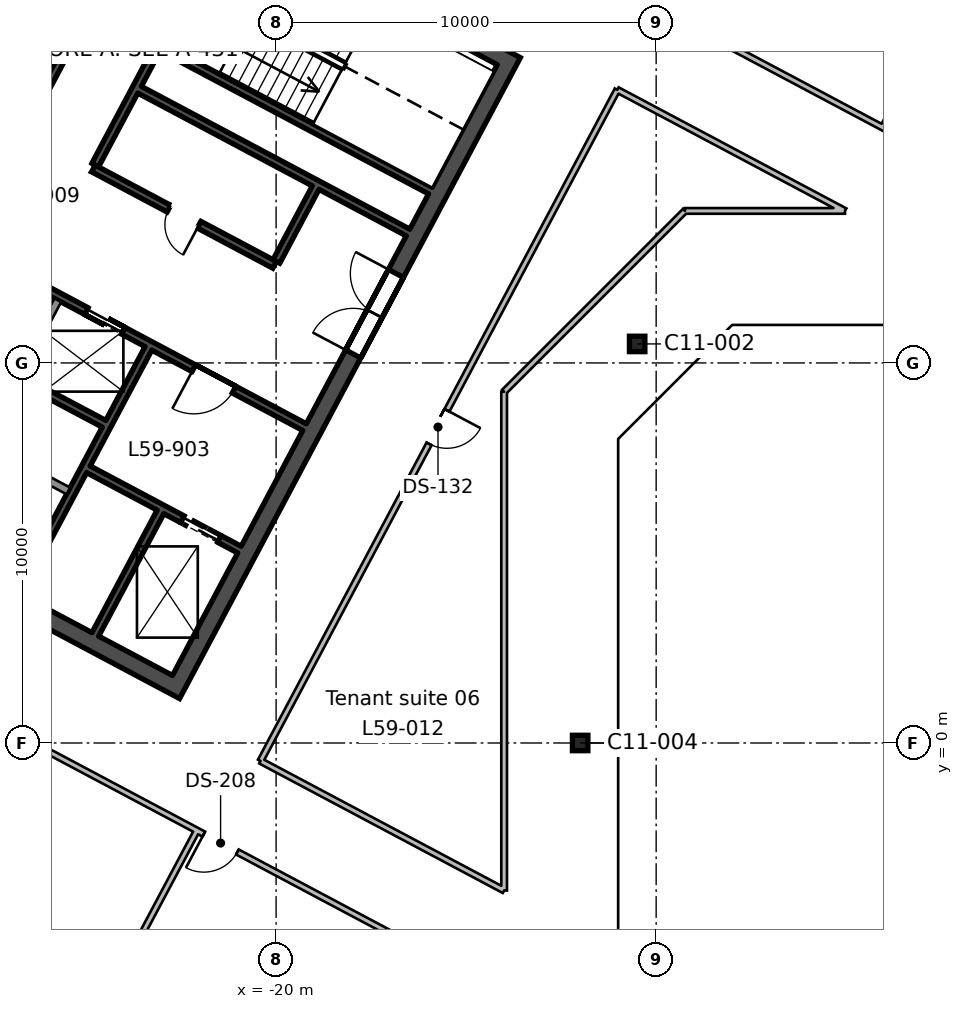
"""IFC4 building model, lengths in metres.
Left out: names, types, materials, properties, quantities, classifications, styles, units other than length and angle.
Written with IfcOpenShell. Run it as: python <this file> out.ifc"""

import sys

from ifc_helpers import new_model, si_unit, direction, frame, frame_2d, origin, origin_2d, place, context, subcontext, project, spatial, rectangle, hollow_rectangle, extrude, element, fill, save


model = new_model("IFC4")
c1 = context("Model", 3, precision=1e-05, world=origin(), true_north=direction((0.0, 1.0)))
c2 = subcontext(c1, "Body", "Model", "MODEL_VIEW")
j1 = project(units=[si_unit("LENGTHUNIT", "METRE"), si_unit("PLANEANGLEUNIT", "RADIAN")], contexts=[c1])
p1 = place(None, origin())
s1 = spatial("IfcSite", under=j1, at=p1, CompositionType="ELEMENT")
p2 = place(p1, origin())
s2 = spatial("IfcBuilding", under=s1, at=p2, CompositionType="ELEMENT")
p3 = place(p2, frame((0.0, 0.0, 265.8)))
s3 = spatial("IfcBuildingStorey", under=s2, at=p3, CompositionType="ELEMENT", Elevation=265.8)
for number, where, z_axis, x_axis in (
    (1, (-12.0, 0.0, 0.0), (0.0, 0.0, 1.0), (1.0, 0.0, 0.0)),
    (2, (-10.5, 10.5, 0.0), (0.0, 0.0, 1.0), (1.0, 0.0, 0.0)),
):
    element("IfcColumn", number, at=place(p3, frame(where, z_axis=z_axis, x_axis=x_axis)), inside=s3, PredefinedType="COLUMN", context=c2, shape_type="SweptSolid", body=[
        extrude(hollow_rectangle(XDim=0.406, YDim=0.406, WallThickness=0.009, InnerFilletRadius=0.004, OuterFilletRadius=0.013, at=origin_2d()), origin(), (0.0, 0.0, 1.0), 3.9),
    ])
p4 = place(p3, frame((-13.771, 18.138, 0.0), z_axis=(0.0, 0.0, 1.0), x_axis=(-0.469467968382, -0.882949504028, 0.0)))
e3 = element("IfcWall", 3, at=p4, inside=s3, PredefinedType="SHEAR", context=c2, shape_type="SweptSolid", body=[
    extrude(rectangle(XDim=19.1, YDim=0.45, at=frame_2d((9.55, 0.0))), origin(), (0.0, 0.0, 1.0), 3.9),
])
p5 = place(p4, frame((6.55, 0.0, 0.0)))
e4 = element("IfcOpeningElement", 4, at=p5, cuts=e3, PredefinedType="OPENING", context=c2, shape_type="SweptSolid", body=[
    extrude(rectangle(XDim=2.4, YDim=2.4, at=frame_2d((1.2, 1.2))), frame((0.0, 0.235, 0.0), z_axis=(0.0, -1.0, 0.0), x_axis=(1.0, 0.0, 0.0)), (0.0, 0.0, 1.0), 0.47),
])
p6 = place(p3, frame((-14.076, 18.045, 0.0), z_axis=(0.0, 0.0, 1.0), x_axis=(-0.882947755831, 0.46947125628, 0.0)))
e5 = element("IfcWall", 5, at=p6, inside=s3, PredefinedType="SHEAR", context=c2, shape_type="SweptSolid", body=[
    extrude(rectangle(XDim=20.2, YDim=0.45, at=frame_2d((10.1, 0.0))), origin(), (0.0, 0.0, 1.0), 3.9),
])
p7 = place(p3, frame((-22.832, 1.578, 0.0), z_axis=(0.0, 0.0, 1.0), x_axis=(-0.88294509198, 0.469476266226, 0.0)))
e6 = element("IfcWall", 6, at=p7, inside=s3, PredefinedType="SHEAR", context=c2, shape_type="SweptSolid", body=[
    extrude(rectangle(XDim=20.2, YDim=0.45, at=frame_2d((10.1, 0.0))), origin(), (0.0, 0.0, 1.0), 3.9),
])
p8 = place(p3, frame((-23.043, 6.08, 0.0), z_axis=(0.0, 0.0, 1.0), x_axis=(-0.469494272526, -0.882935517501, 0.0)))
e7 = element("IfcWall", 7, at=p8, inside=s3, PredefinedType="SHEAR", context=c2, shape_type="SweptSolid", body=[
    extrude(rectangle(XDim=3.65, YDim=0.2, at=frame_2d((1.825, 0.0))), origin(), (0.0, 0.0, 1.0), 3.9),
])
p9 = place(p3, frame((-18.96, 14.611, 0.0), z_axis=(0.0, 0.0, 1.0), x_axis=(-0.4694473164, -0.882960484464, 0.0)))
e8 = element("IfcWall", 8, at=p9, inside=s3, PredefinedType="SHEAR", context=c2, shape_type="SweptSolid", body=[
    extrude(rectangle(XDim=2.2, YDim=0.2, at=frame_2d((1.1, 0.0))), origin(), (0.0, 0.0, 1.0), 3.9),
])
p10 = place(p3, frame((-23.36, 10.382, 0.0), z_axis=(0.0, 0.0, 1.0), x_axis=(-0.469480409012, -0.88294288918, 0.0)))
e9 = element("IfcWall", 9, at=p10, inside=s3, PredefinedType="SHEAR", context=c2, shape_type="SweptSolid", body=[
    extrude(rectangle(XDim=7.3, YDim=0.2, at=frame_2d((3.65, 0.0))), origin(), (0.0, 0.0, 1.0), 3.9),
])
p11 = place(p3, frame((-25.744, 11.65, 0.0), z_axis=(0.0, 0.0, 1.0), x_axis=(-0.469487830541, -0.882938942948, 0.0)))
e10 = element("IfcWall", 10, at=p11, inside=s3, PredefinedType="SOLIDWALL", context=c2, shape_type="SweptSolid", body=[
    extrude(rectangle(XDim=2.2, YDim=0.2, at=frame_2d((1.1, 0.0))), origin(), (0.0, 0.0, 1.0), 3.9),
])
p12 = place(p3, frame((-21.333, 21.649, 0.0), z_axis=(0.0, 0.0, 1.0), x_axis=(-0.469494272526, -0.882935517501, 0.0)))
e11 = element("IfcWall", 11, at=p12, inside=s3, PredefinedType="SHEAR", context=c2, shape_type="SweptSolid", body=[
    extrude(rectangle(XDim=7.3, YDim=0.2, at=frame_2d((3.65, 0.0))), origin(), (0.0, 0.0, 1.0), 3.9),
])
p13 = place(p12, frame((1.3, 0.0, 0.0)))
e12 = element("IfcOpeningElement", 12, at=p13, cuts=e11, PredefinedType="OPENING", context=c2, shape_type="SweptSolid", body=[
    extrude(rectangle(XDim=1.2, YDim=2.1, at=frame_2d((0.6, 1.05))), frame((0.0, 0.11, 0.0), z_axis=(0.0, -1.0, 0.0), x_axis=(1.0, 0.0, 0.0)), (0.0, 0.0, 1.0), 0.22),
])
p14 = place(p3, frame((-23.188, 22.635, 0.0), z_axis=(0.0, 0.0, 1.0), x_axis=(-0.469454336211, -0.882956752176, 0.0)))
e13 = element("IfcWall", 13, at=p14, inside=s3, PredefinedType="SHEAR", context=c2, shape_type="SweptSolid", body=[
    extrude(rectangle(XDim=7.3, YDim=0.2, at=frame_2d((3.65, 0.0))), origin(), (0.0, 0.0, 1.0), 3.9),
])
p15 = place(p14, frame((2.05, 0.0, 0.0)))
e14 = element("IfcOpeningElement", 14, at=p15, cuts=e13, PredefinedType="OPENING", context=c2, shape_type="SweptSolid", body=[
    extrude(rectangle(XDim=0.9, YDim=2.1, at=frame_2d((0.45, 1.05))), frame((0.0, 0.11, 0.0), z_axis=(0.0, -1.0, 0.0), x_axis=(1.0, 0.0, 0.0)), (0.0, 0.0, 1.0), 0.22),
])
p16 = place(p3, frame((-15.942, 14.536, 0.0), z_axis=(0.0, 0.0, 1.0), x_axis=(-0.882946947542, 0.469472776449, 0.0)))
e15 = element("IfcWall", 15, at=p16, inside=s3, PredefinedType="SHEAR", context=c2, shape_type="SweptSolid", body=[
    extrude(rectangle(XDim=8.0, YDim=0.2, at=frame_2d((4.0, 0.0))), origin(), (0.0, 0.0, 1.0), 3.9),
])
p17 = place(p3, frame((-16.529, 13.432, 0.0), z_axis=(0.0, 0.0, 1.0), x_axis=(-0.88295287151, 0.469461634952, 0.0)))
e16 = element("IfcWall", 16, at=p17, inside=s3, PredefinedType="SHEAR", context=c2, shape_type="SweptSolid", body=[
    extrude(rectangle(XDim=8.0, YDim=0.2, at=frame_2d((4.0, 0.0))), origin(), (0.0, 0.0, 1.0), 3.9),
])
p18 = place(p3, frame((-25.623, 18.268, 0.0), z_axis=(0.0, 0.0, 1.0), x_axis=(-0.882953967957, 0.469459572775, 0.0)))
e17 = element("IfcWall", 17, at=p18, inside=s3, PredefinedType="SHEAR", context=c2, shape_type="SweptSolid", body=[
    extrude(rectangle(XDim=5.2, YDim=0.2, at=frame_2d((2.6, 0.0))), origin(), (0.0, 0.0, 1.0), 3.9),
])
p19 = place(p3, frame((-20.04, 12.581, 0.0), z_axis=(0.0, 0.0, 1.0), x_axis=(-0.882942972946, 0.469480251476, 0.0)))
e18 = element("IfcWall", 18, at=p19, inside=s3, PredefinedType="SHEAR", context=c2, shape_type="SweptSolid", body=[
    extrude(rectangle(XDim=5.4, YDim=0.2, at=frame_2d((2.7, 0.0))), origin(), (0.0, 0.0, 1.0), 3.9),
])
p20 = place(p19, frame((2.25, 0.0, 0.0)))
e19 = element("IfcOpeningElement", 19, at=p20, cuts=e18, PredefinedType="OPENING", context=c2, shape_type="SweptSolid", body=[
    extrude(rectangle(XDim=0.9, YDim=2.1, at=frame_2d((0.45, 1.05))), frame((0.0, 0.11, 0.0), z_axis=(0.0, -1.0, 0.0), x_axis=(1.0, 0.0, 0.0)), (0.0, 0.0, 1.0), 0.22),
])
p21 = place(p3, frame((-19.252, 8.311, 0.0), z_axis=(0.0, 0.0, 1.0), x_axis=(-0.882955722218, 0.469456273365, 0.0)))
e20 = element("IfcWall", 20, at=p21, inside=s3, PredefinedType="SHEAR", context=c2, shape_type="SweptSolid", body=[
    extrude(rectangle(XDim=10.0, YDim=0.2, at=frame_2d((5.0, 0.0))), origin(), (0.0, 0.0, 1.0), 3.9),
])
p22 = place(p21, frame((2.1, 0.0, 0.0)))
e21 = element("IfcOpeningElement", 21, at=p22, cuts=e20, PredefinedType="OPENING", context=c2, shape_type="SweptSolid", body=[
    extrude(rectangle(XDim=1.2, YDim=2.1, at=frame_2d((0.6, 1.05))), frame((0.0, 0.11, 0.0), z_axis=(0.0, -1.0, 0.0), x_axis=(1.0, 0.0, 0.0)), (0.0, 0.0, 1.0), 0.22),
])
p23 = place(p21, frame((5.4, 0.0, 0.0)))
e22 = element("IfcOpeningElement", 22, at=p23, cuts=e20, PredefinedType="OPENING", context=c2, shape_type="SweptSolid", body=[
    extrude(rectangle(XDim=1.1, YDim=2.1, at=frame_2d((0.55, 1.05))), frame((0.0, 0.11, 0.0), z_axis=(0.0, -1.0, 0.0), x_axis=(1.0, 0.0, 0.0)), (0.0, 0.0, 1.0), 0.22),
])
p24 = place(p21, frame((8.1, 0.0, 0.0)))
e23 = element("IfcOpeningElement", 23, at=p24, cuts=e20, PredefinedType="OPENING", context=c2, shape_type="SweptSolid", body=[
    extrude(rectangle(XDim=1.1, YDim=2.1, at=frame_2d((0.55, 1.05))), frame((0.0, 0.11, 0.0), z_axis=(0.0, -1.0, 0.0), x_axis=(1.0, 0.0, 0.0)), (0.0, 0.0, 1.0), 0.22),
])
p25 = place(p3, frame((-24.528, 8.398, 0.0), z_axis=(0.0, 0.0, 1.0), x_axis=(-0.882953967957, 0.469459572775, 0.0)))
e24 = element("IfcWall", 24, at=p25, inside=s3, PredefinedType="SHEAR", context=c2, shape_type="SweptSolid", body=[
    extrude(rectangle(XDim=5.2, YDim=0.2, at=frame_2d((2.6, 0.0))), origin(), (0.0, 0.0, 1.0), 3.9),
])
p26 = place(p3, frame((-20.965, 5.088, 0.0), z_axis=(0.0, 0.0, 1.0), x_axis=(-0.882925986334, 0.469512196493, 0.0)))
e25 = element("IfcWall", 25, at=p26, inside=s3, PredefinedType="SHEAR", context=c2, shape_type="SweptSolid", body=[
    extrude(rectangle(XDim=4.5, YDim=0.2, at=frame_2d((2.25, 0.0))), origin(), (0.0, 0.0, 1.0), 3.9),
])
p27 = place(p26, frame((0.6, 0.0, 0.0)))
e26 = element("IfcOpeningElement", 26, at=p27, cuts=e25, PredefinedType="OPENING", context=c2, shape_type="SweptSolid", body=[
    extrude(rectangle(XDim=1.1, YDim=2.1, at=frame_2d((0.55, 1.05))), frame((0.0, 0.11, 0.0), z_axis=(0.0, -1.0, 0.0), x_axis=(1.0, 0.0, 0.0)), (0.0, 0.0, 1.0), 0.22),
])
p28 = place(p3, frame((-25.467, 6.633, 0.0), z_axis=(0.0, 0.0, 1.0), x_axis=(-0.882953967957, 0.469459572775, 0.0)))
e27 = element("IfcWall", 27, at=p28, inside=s3, PredefinedType="SOLIDWALL", context=c2, shape_type="SweptSolid", body=[
    extrude(rectangle(XDim=5.2, YDim=0.2, at=frame_2d((2.6, 0.0))), origin(), (0.0, 0.0, 1.0), 3.9),
])
p29 = place(p3, frame((-48.541, 39.854, 0.0), z_axis=(0.0, 0.0, 1.0), x_axis=(0.882945008423, -0.469476423372, 0.0)))
e28 = element("IfcWall", 28, at=p29, inside=s3, PredefinedType="PARTITIONING", context=c2, shape_type="SweptSolid", body=[
    extrude(rectangle(XDim=54.976, YDim=0.15, at=frame_2d((27.488, 0.0))), origin(), (0.0, 0.0, 1.0), 3.54),
])
p30 = place(p29, frame((50.65, 0.0, 0.0)))
e29 = element("IfcOpeningElement", 29, at=p30, cuts=e28, PredefinedType="OPENING", context=c2, shape_type="SweptSolid", body=[
    extrude(rectangle(XDim=1.8, YDim=2.1, at=frame_2d((0.9, 1.05))), frame((0.0, 0.085, 0.0), z_axis=(0.0, -1.0, 0.0), x_axis=(1.0, 0.0, 0.0)), (0.0, 0.0, 1.0), 0.17),
])
p31 = place(p29, frame((39.35, 0.0, 0.0)))
e30 = element("IfcOpeningElement", 30, at=p31, cuts=e28, PredefinedType="OPENING", context=c2, shape_type="SweptSolid", body=[
    extrude(rectangle(XDim=1.0, YDim=2.1, at=frame_2d((0.5, 1.05))), frame((0.0, 0.085, 0.0), z_axis=(0.0, -1.0, 0.0), x_axis=(1.0, 0.0, 0.0)), (0.0, 0.0, 1.0), 0.17),
])
p32 = place(p29, frame((26.95, 0.0, 0.0)))
e31 = element("IfcOpeningElement", 31, at=p32, cuts=e28, PredefinedType="OPENING", context=c2, shape_type="SweptSolid", body=[
    extrude(rectangle(XDim=1.0, YDim=2.1, at=frame_2d((0.5, 1.05))), frame((0.0, 0.085, 0.0), z_axis=(0.0, -1.0, 0.0), x_axis=(1.0, 0.0, 0.0)), (0.0, 0.0, 1.0), 0.17),
])
p33 = place(p29, frame((21.049, 0.0, 0.0)))
e32 = element("IfcOpeningElement", 32, at=p33, cuts=e28, PredefinedType="OPENING", context=c2, shape_type="SweptSolid", body=[
    extrude(rectangle(XDim=1.0, YDim=2.1, at=frame_2d((0.5, 1.05))), frame((0.0, 0.085, 0.0), z_axis=(0.0, -1.0, 0.0), x_axis=(1.0, 0.0, 0.0)), (0.0, 0.0, 1.0), 0.17),
])
p34 = place(p29, frame((15.35, 0.0, 0.0)))
e33 = element("IfcOpeningElement", 33, at=p34, cuts=e28, PredefinedType="OPENING", context=c2, shape_type="SweptSolid", body=[
    extrude(rectangle(XDim=1.0, YDim=2.1, at=frame_2d((0.5, 1.05))), frame((0.0, 0.085, 0.0), z_axis=(0.0, -1.0, 0.0), x_axis=(1.0, 0.0, 0.0)), (0.0, 0.0, 1.0), 0.17),
])
p35 = place(p3, frame((-14.0, -6.6, 0.0), z_axis=(0.0, 0.0, 1.0), x_axis=(-0.88294319167, 0.469479840125, 0.0)))
e34 = element("IfcWall", 34, at=p35, inside=s3, PredefinedType="PARTITIONING", context=c2, shape_type="SweptSolid", body=[
    extrude(rectangle(XDim=36.344, YDim=0.15, at=frame_2d((18.172, 0.0))), origin(), (0.0, 0.0, 1.0), 3.54),
])
p36 = place(p35, frame((25.35, 0.0, 0.0)))
e35 = element("IfcOpeningElement", 35, at=p36, cuts=e34, PredefinedType="OPENING", context=c2, shape_type="SweptSolid", body=[
    extrude(rectangle(XDim=1.0, YDim=2.1, at=frame_2d((0.5, 1.05))), frame((0.0, 0.085, 0.0), z_axis=(0.0, -1.0, 0.0), x_axis=(1.0, 0.0, 0.0)), (0.0, 0.0, 1.0), 0.17),
])
p37 = place(p35, frame((17.65, 0.0, 0.0)))
e36 = element("IfcOpeningElement", 36, at=p37, cuts=e34, PredefinedType="OPENING", context=c2, shape_type="SweptSolid", body=[
    extrude(rectangle(XDim=1.0, YDim=2.1, at=frame_2d((0.5, 1.05))), frame((0.0, 0.085, 0.0), z_axis=(0.0, -1.0, 0.0), x_axis=(1.0, 0.0, 0.0)), (0.0, 0.0, 1.0), 0.17),
])
p38 = place(p35, frame((7.95, 0.0, 0.0)))
e37 = element("IfcOpeningElement", 37, at=p38, cuts=e34, PredefinedType="OPENING", context=c2, shape_type="SweptSolid", body=[
    extrude(rectangle(XDim=1.0, YDim=2.1, at=frame_2d((0.5, 1.05))), frame((0.0, 0.085, 0.0), z_axis=(0.0, -1.0, 0.0), x_axis=(1.0, 0.0, 0.0)), (0.0, 0.0, 1.0), 0.17),
])
p39 = place(p3, frame((-22.083, -2.302, 0.0), z_axis=(0.0, 0.0, 1.0), x_axis=(-0.469445946219, -0.882961212952, 0.0)))
e38 = element("IfcWall", 38, at=p39, inside=s3, PredefinedType="PARTITIONING", context=c2, shape_type="SweptSolid", body=[
    extrude(rectangle(XDim=8.8, YDim=0.15, at=frame_2d((4.4, 0.0))), origin(), (0.0, 0.0, 1.0), 3.54),
])
p40 = place(p3, frame((-0.195, 23.418, 0.0), z_axis=(0.0, 0.0, 1.0), x_axis=(-0.469409645302, -0.882980512184, 0.0)))
e39 = element("IfcWall", 39, at=p40, inside=s3, PredefinedType="PARTITIONING", context=c2, shape_type="SweptSolid", body=[
    extrude(rectangle(XDim=8.185, YDim=0.15, at=frame_2d((4.092, 0.0))), origin(), (0.0, 0.0, 1.0), 3.54),
])
p41 = place(p3, frame((-20.411, -0.473, 0.0), z_axis=(0.0, 0.0, 1.0), x_axis=(0.469451816494, 0.882958091865, 0.0)))
e40 = element("IfcWall", 40, at=p41, inside=s3, PredefinedType="PARTITIONING", context=c2, shape_type="SweptSolid", body=[
    extrude(rectangle(XDim=20.0, YDim=0.15, at=frame_2d((10.0, 0.0))), origin(), (0.0, 0.0, 1.0), 3.54),
])
p42 = place(p41, frame((9.45, 0.0, 0.0)))
e41 = element("IfcOpeningElement", 41, at=p42, cuts=e40, PredefinedType="OPENING", context=c2, shape_type="SweptSolid", body=[
    extrude(rectangle(XDim=1.0, YDim=2.1, at=frame_2d((0.5, 1.05))), frame((0.0, 0.085, 0.0), z_axis=(0.0, -1.0, 0.0), x_axis=(1.0, 0.0, 0.0)), (0.0, 0.0, 1.0), 0.17),
])
p43 = place(p3, frame((-11.022, 17.186, 0.0), z_axis=(0.0, 0.0, 1.0), x_axis=(0.882943783905, -0.469478726316, 0.0)))
e42 = element("IfcWall", 42, at=p43, inside=s3, PredefinedType="PARTITIONING", context=c2, shape_type="SweptSolid", body=[
    extrude(rectangle(XDim=6.786, YDim=0.15, at=frame_2d((3.393, 0.0))), origin(), (0.0, 0.0, 1.0), 3.54),
])
p44 = place(p3, frame((-5.03, 14.0, 0.0), z_axis=(0.0, 0.0, 1.0), x_axis=(-1.0, 0.0, 0.0)))
e43 = element("IfcWall", 43, at=p44, inside=s3, PredefinedType="PARTITIONING", context=c2, shape_type="SweptSolid", body=[
    extrude(rectangle(XDim=4.213, YDim=0.15, at=frame_2d((2.106, 0.0))), origin(), (0.0, 0.0, 1.0), 3.54),
])
p45 = place(p3, frame((-9.243, 14.0, 0.0), z_axis=(0.0, 0.0, 1.0), x_axis=(-0.707106781187, -0.707106781187, 0.0)))
e44 = element("IfcWall", 44, at=p45, inside=s3, PredefinedType="PARTITIONING", context=c2, shape_type="SweptSolid", body=[
    extrude(rectangle(XDim=6.728, YDim=0.15, at=frame_2d((3.364, 0.0))), origin(), (0.0, 0.0, 1.0), 3.54),
])
p46 = place(p3, frame((-14.0, 9.243, 0.0), z_axis=(0.0, 0.0, 1.0), x_axis=(0.0, -1.0, 0.0)))
e45 = element("IfcWall", 45, at=p46, inside=s3, PredefinedType="PARTITIONING", context=c2, shape_type="SweptSolid", body=[
    extrude(rectangle(XDim=13.125, YDim=0.15, at=frame_2d((6.562, 0.0))), origin(), (0.0, 0.0, 1.0), 3.54),
])
p47 = place(p3, frame((-14.0, -3.882, 0.0), z_axis=(0.0, 0.0, 1.0), x_axis=(-0.882921917986, 0.469519847014, 0.0)))
e46 = element("IfcWall", 46, at=p47, inside=s3, PredefinedType="PARTITIONING", context=c2, shape_type="SweptSolid", body=[
    extrude(rectangle(XDim=7.261, YDim=0.15, at=frame_2d((3.63, 0.0))), origin(), (0.0, 0.0, 1.0), 3.54),
])
p48 = place(p5, frame((2.4, 0.0, 0.0), z_axis=(0.0, 0.0, 1.0), x_axis=(-1.0, 0.0, 0.0)))
e47 = element("IfcDoor", 47, at=p48, inside=s3, OperationType="DOUBLE_DOOR_SINGLE_SWING", PredefinedType="DOOR", context=c2, shape_type="SweptSolid", body=[
    extrude(rectangle(XDim=2.4, YDim=2.4, at=frame_2d((1.2, 1.2))), frame((0.0, 0.025, 0.0), z_axis=(0.0, -1.0, 0.0), x_axis=(1.0, 0.0, 0.0)), (0.0, 0.0, 1.0), 0.05),
])
fill(e4, e47)
p49 = place(p22, origin())
e48 = element("IfcDoor", 48, at=p49, inside=s3, OperationType="SINGLE_SWING_RIGHT", PredefinedType="DOOR", context=c2, shape_type="SweptSolid", body=[
    extrude(rectangle(XDim=1.2, YDim=2.1, at=frame_2d((0.6, 1.05))), frame((0.0, 0.025, 0.0), z_axis=(0.0, -1.0, 0.0), x_axis=(1.0, 0.0, 0.0)), (0.0, 0.0, 1.0), 0.05),
])
fill(e21, e48)
p50 = place(p20, origin())
e49 = element("IfcDoor", 49, at=p50, inside=s3, OperationType="SINGLE_SWING_LEFT", PredefinedType="DOOR", context=c2, shape_type="SweptSolid", body=[
    extrude(rectangle(XDim=0.9, YDim=2.1, at=frame_2d((0.45, 1.05))), frame((0.0, 0.025, 0.0), z_axis=(0.0, -1.0, 0.0), x_axis=(1.0, 0.0, 0.0)), (0.0, 0.0, 1.0), 0.05),
])
fill(e19, e49)
p51 = place(p23, origin())
e50 = element("IfcDoor", 50, at=p51, inside=s3, OperationType="DOUBLE_DOOR_SLIDING", PredefinedType="DOOR", context=c2, shape_type="SweptSolid", body=[
    extrude(rectangle(XDim=1.1, YDim=2.1, at=frame_2d((0.55, 1.05))), frame((0.0, 0.025, 0.0), z_axis=(0.0, -1.0, 0.0), x_axis=(1.0, 0.0, 0.0)), (0.0, 0.0, 1.0), 0.05),
])
fill(e22, e50)
p52 = place(p27, origin())
e51 = element("IfcDoor", 51, at=p52, inside=s3, OperationType="DOUBLE_DOOR_SLIDING", PredefinedType="DOOR", context=c2, shape_type="SweptSolid", body=[
    extrude(rectangle(XDim=1.1, YDim=2.1, at=frame_2d((0.55, 1.05))), frame((0.0, 0.025, 0.0), z_axis=(0.0, -1.0, 0.0), x_axis=(1.0, 0.0, 0.0)), (0.0, 0.0, 1.0), 0.05),
])
fill(e26, e51)
p53 = place(p42, frame((1.0, 0.0, 0.0), z_axis=(0.0, 0.0, 1.0), x_axis=(-1.0, 0.0, 0.0)))
e52 = element("IfcDoor", 52, at=p53, inside=s3, OperationType="SINGLE_SWING_LEFT", PredefinedType="DOOR", context=c2, shape_type="SweptSolid", body=[
    extrude(rectangle(XDim=1.0, YDim=2.1, at=frame_2d((0.5, 1.05))), frame((0.0, 0.025, 0.0), z_axis=(0.0, -1.0, 0.0), x_axis=(1.0, 0.0, 0.0)), (0.0, 0.0, 1.0), 0.05),
])
fill(e41, e52)
p54 = place(p38, origin())
e53 = element("IfcDoor", 53, at=p54, inside=s3, OperationType="SINGLE_SWING_RIGHT", PredefinedType="DOOR", context=c2, shape_type="SweptSolid", body=[
    extrude(rectangle(XDim=1.0, YDim=2.1, at=frame_2d((0.5, 1.05))), frame((0.0, 0.025, 0.0), z_axis=(0.0, -1.0, 0.0), x_axis=(1.0, 0.0, 0.0)), (0.0, 0.0, 1.0), 0.05),
])
fill(e37, e53)
save(model, sys.argv[1])
